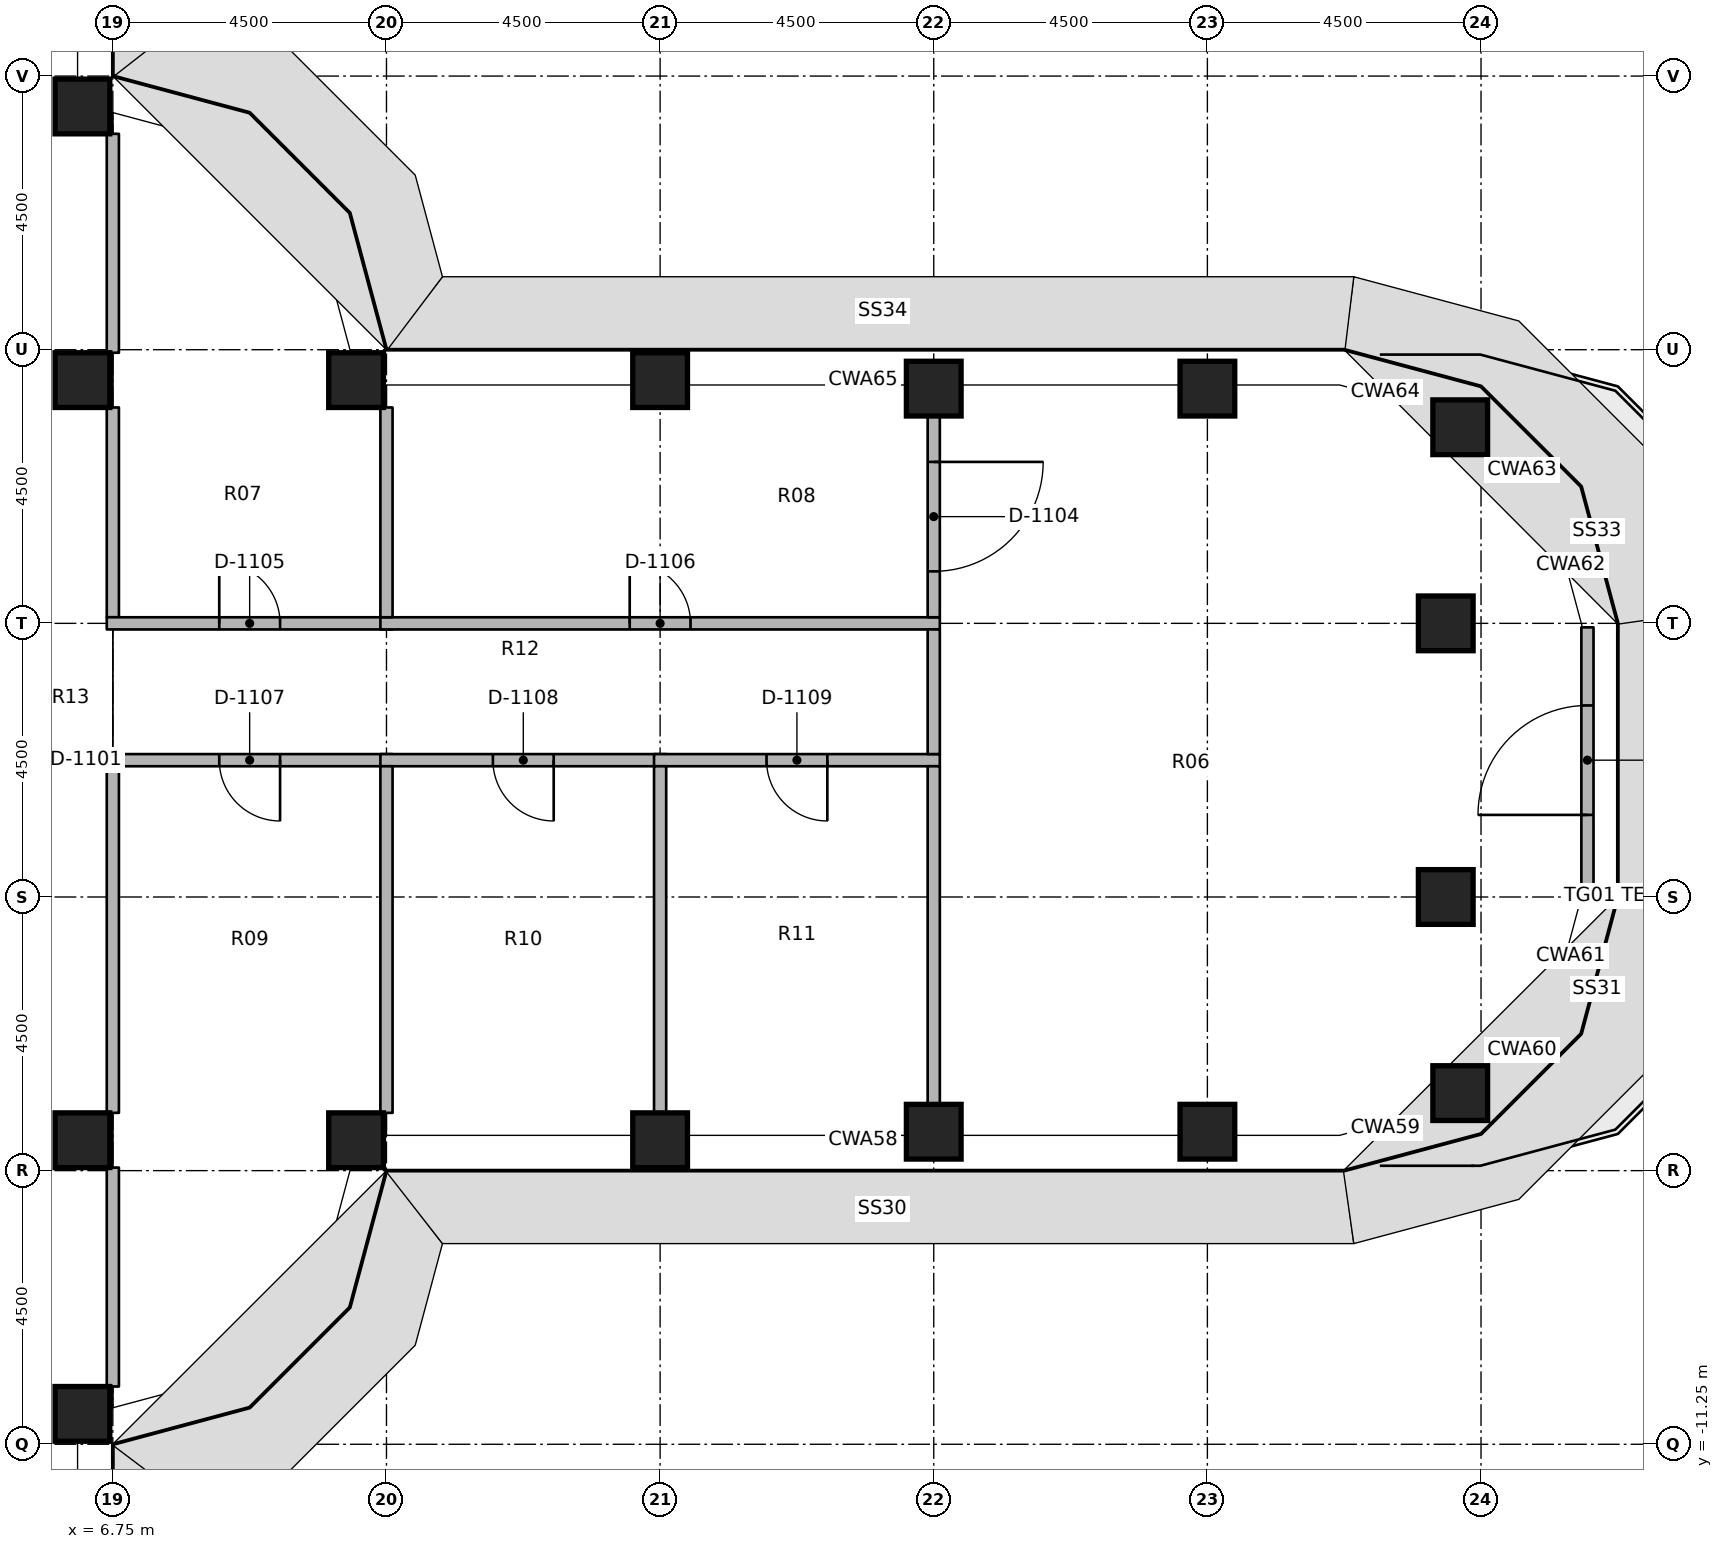
"""IFC4 building model, lengths in metres.
Left out: names, types, materials, properties, quantities, classifications, styles, units other than length and angle.
Written with IfcOpenShell. Run it as: python <this file> out.ifc"""

import sys

from ifc_helpers import new_model, si_unit, direction, frame, frame_2d, origin, origin_2d, place, context, subcontext, project, spatial, rectangle, extrude, element, fill, save


model = new_model("IFC4")
c1 = context("Model", 3, precision=1e-05, world=origin(), true_north=direction((0.0, 1.0)))
c2 = subcontext(c1, "Body", "Model", "MODEL_VIEW")
j1 = project(units=[si_unit("LENGTHUNIT", "METRE"), si_unit("PLANEANGLEUNIT", "RADIAN")], contexts=[c1])
p1 = place(None, origin())
s1 = spatial("IfcSite", under=j1, at=p1, CompositionType="ELEMENT")
p2 = place(p1, origin())
s2 = spatial("IfcBuilding", under=s1, at=p2, CompositionType="ELEMENT")
p3 = place(p2, frame((0.0, 0.0, 124.6)))
s3 = spatial("IfcBuildingStorey", under=s2, at=p3, CompositionType="ELEMENT", Elevation=124.6)
for number, where, z_axis, x_axis in (
    (1, (6.25, -10.75, 0.0), (0.0, 0.0, 1.0), (1.0, 0.0, 0.0)),
    (2, (6.25, -6.25, 0.0), (0.0, 0.0, 1.0), (1.0, 0.0, 0.0)),
    (3, (6.25, 6.25, 0.0), (0.0, 0.0, 1.0), (1.0, 0.0, 0.0)),
    (4, (6.25, 10.75, 0.0), (0.0, 0.0, 1.0), (1.0, 0.0, 0.0)),
    (5, (10.75, -6.25, 0.0), (0.0, 0.0, 1.0), (1.0, 0.0, 0.0)),
    (6, (10.75, 6.25, 0.0), (0.0, 0.0, 1.0), (1.0, 0.0, 0.0)),
    (7, (15.75, -6.25, 0.0), (0.0, 0.0, 1.0), (1.0, 0.0, 0.0)),
    (8, (15.75, 6.25, 0.0), (0.0, 0.0, 1.0), (1.0, 0.0, 0.0)),
    (9, (20.25, -6.11, 0.0), (0.0, 0.0, 1.0), (1.0, 0.0, 0.0)),
    (10, (20.25, 6.11, 0.0), (0.0, 0.0, 1.0), (1.0, 0.0, 0.0)),
    (11, (24.75, -6.11, 0.0), (0.0, 0.0, 1.0), (1.0, 0.0, 0.0)),
    (12, (24.75, 6.11, 0.0), (0.0, 0.0, 1.0), (1.0, 0.0, 0.0)),
    (13, (28.908, -5.475, 0.0), (0.0, 0.0, 1.0), (1.0, 0.0, 0.0)),
    (14, (28.67, -2.25, 0.0), (0.0, 0.0, 1.0), (1.0, 0.0, 0.0)),
    (15, (28.67, 2.25, 0.0), (0.0, 0.0, 1.0), (1.0, 0.0, 0.0)),
    (16, (28.908, 5.475, 0.0), (0.0, 0.0, 1.0), (1.0, 0.0, 0.0)),
):
    element("IfcColumn", number, at=place(p3, frame(where, z_axis=z_axis, x_axis=x_axis)), inside=s3, PredefinedType="COLUMN", context=c2, shape_type="SweptSolid", body=[
        extrude(rectangle(XDim=0.9, YDim=0.9, at=origin_2d()), origin(), (0.0, 0.0, 1.0), 3.65),
    ])
p4 = place(p3, frame((31.0, -2.184, 0.0), z_axis=(0.0, 0.0, 1.0), x_axis=(0.0, 1.0, 0.0)))
e17 = element("IfcWall", 17, at=p4, inside=s3, PredefinedType="SOLIDWALL", context=c2, shape_type="SweptSolid", body=[
    extrude(rectangle(XDim=4.368, YDim=0.2, at=frame_2d((2.184, 0.0))), origin(), (0.0, 0.0, 1.0), 2.75),
])
p5 = place(p4, frame((1.284, 0.0, 0.0)))
e18 = element("IfcOpeningElement", 18, at=p5, cuts=e17, PredefinedType="OPENING", context=c2, shape_type="SweptSolid", body=[
    extrude(rectangle(XDim=1.8, YDim=2.4, at=frame_2d((0.9, 1.2))), frame((0.0, 0.11, 0.0), z_axis=(0.0, -1.0, 0.0), x_axis=(1.0, 0.0, 0.0)), (0.0, 0.0, 1.0), 0.22),
])
p6 = place(p3, frame((6.75, 2.35, 0.0), z_axis=(0.0, 0.0, 1.0), x_axis=(0.0, 1.0, 0.0)))
e19 = element("IfcWall", 19, at=p6, inside=s3, PredefinedType="PARTITIONING", context=c2, shape_type="SweptSolid", body=[
    extrude(rectangle(XDim=3.45, YDim=0.2, at=frame_2d((1.725, 0.0))), origin(), (0.0, 0.0, 1.0), 2.738),
])
for number, where, z_axis, x_axis in (
    (20, (6.75, 6.7, 0.0), (0.0, 0.0, 1.0), (0.0, 1.0, 0.0)),
    (21, (6.75, -10.3, 0.0), (0.0, 0.0, 1.0), (0.0, 1.0, 0.0)),
):
    element("IfcWall", number, at=place(p3, frame(where, z_axis=z_axis, x_axis=x_axis)), inside=s3, PredefinedType="PARTITIONING", context=c2, shape_type="SweptSolid", body=[
        extrude(rectangle(XDim=3.6, YDim=0.2, at=frame_2d((1.8, 0.0))), origin(), (0.0, 0.0, 1.0), 2.738),
    ])
p7 = place(p3, frame((6.75, -5.8, 0.0), z_axis=(0.0, 0.0, 1.0), x_axis=(0.0, 1.0, 0.0)))
e22 = element("IfcWall", 22, at=p7, inside=s3, PredefinedType="PARTITIONING", context=c2, shape_type="SweptSolid", body=[
    extrude(rectangle(XDim=5.7, YDim=0.2, at=frame_2d((2.85, 0.0))), origin(), (0.0, 0.0, 1.0), 2.738),
])
p8 = place(p3, frame((6.65, 2.25, 0.0), z_axis=(0.0, 0.0, 1.0), x_axis=(1.0, 0.0, 0.0)))
e23 = element("IfcWall", 23, at=p8, inside=s3, PredefinedType="PARTITIONING", context=c2, shape_type="SweptSolid", body=[
    extrude(rectangle(XDim=4.7, YDim=0.2, at=frame_2d((2.35, 0.0))), origin(), (0.0, 0.0, 1.0), 2.738),
])
p9 = place(p8, frame((1.85, 0.0, 0.0)))
e24 = element("IfcOpeningElement", 24, at=p9, cuts=e23, PredefinedType="OPENING", context=c2, shape_type="SweptSolid", body=[
    extrude(rectangle(XDim=1.0, YDim=2.1, at=frame_2d((0.5, 1.05))), frame((0.0, 0.11, 0.0), z_axis=(0.0, -1.0, 0.0), x_axis=(1.0, 0.0, 0.0)), (0.0, 0.0, 1.0), 0.22),
])
p10 = place(p3, frame((11.35, 0.0, 0.0), z_axis=(0.0, 0.0, 1.0), x_axis=(-1.0, 0.0, 0.0)))
e25 = element("IfcWall", 25, at=p10, inside=s3, PredefinedType="PARTITIONING", context=c2, shape_type="SweptSolid", body=[
    extrude(rectangle(XDim=4.7, YDim=0.2, at=frame_2d((2.35, 0.0))), origin(), (0.0, 0.0, 1.0), 2.738),
])
p11 = place(p10, frame((1.85, 0.0, 0.0)))
e26 = element("IfcOpeningElement", 26, at=p11, cuts=e25, PredefinedType="OPENING", context=c2, shape_type="SweptSolid", body=[
    extrude(rectangle(XDim=1.0, YDim=2.1, at=frame_2d((0.5, 1.05))), frame((0.0, 0.11, 0.0), z_axis=(0.0, -1.0, 0.0), x_axis=(1.0, 0.0, 0.0)), (0.0, 0.0, 1.0), 0.22),
])
p12 = place(p3, frame((11.15, 2.25, 0.0), z_axis=(0.0, 0.0, 1.0), x_axis=(1.0, 0.0, 0.0)))
e27 = element("IfcWall", 27, at=p12, inside=s3, PredefinedType="PARTITIONING", context=c2, shape_type="SweptSolid", body=[
    extrude(rectangle(XDim=9.2, YDim=0.2, at=frame_2d((4.6, 0.0))), origin(), (0.0, 0.0, 1.0), 2.738),
])
p13 = place(p12, frame((4.1, 0.0, 0.0)))
e28 = element("IfcOpeningElement", 28, at=p13, cuts=e27, PredefinedType="OPENING", context=c2, shape_type="SweptSolid", body=[
    extrude(rectangle(XDim=1.0, YDim=2.1, at=frame_2d((0.5, 1.05))), frame((0.0, 0.11, 0.0), z_axis=(0.0, -1.0, 0.0), x_axis=(1.0, 0.0, 0.0)), (0.0, 0.0, 1.0), 0.22),
])
p14 = place(p3, frame((15.85, 0.0, 0.0), z_axis=(0.0, 0.0, 1.0), x_axis=(-1.0, 0.0, 0.0)))
e29 = element("IfcWall", 29, at=p14, inside=s3, PredefinedType="PARTITIONING", context=c2, shape_type="SweptSolid", body=[
    extrude(rectangle(XDim=4.7, YDim=0.2, at=frame_2d((2.35, 0.0))), origin(), (0.0, 0.0, 1.0), 2.738),
])
p15 = place(p14, frame((1.85, 0.0, 0.0)))
e30 = element("IfcOpeningElement", 30, at=p15, cuts=e29, PredefinedType="OPENING", context=c2, shape_type="SweptSolid", body=[
    extrude(rectangle(XDim=1.0, YDim=2.1, at=frame_2d((0.5, 1.05))), frame((0.0, 0.11, 0.0), z_axis=(0.0, -1.0, 0.0), x_axis=(1.0, 0.0, 0.0)), (0.0, 0.0, 1.0), 0.22),
])
p16 = place(p3, frame((20.35, 0.0, 0.0), z_axis=(0.0, 0.0, 1.0), x_axis=(-1.0, 0.0, 0.0)))
e31 = element("IfcWall", 31, at=p16, inside=s3, PredefinedType="PARTITIONING", context=c2, shape_type="SweptSolid", body=[
    extrude(rectangle(XDim=4.7, YDim=0.2, at=frame_2d((2.35, 0.0))), origin(), (0.0, 0.0, 1.0), 2.738),
])
p17 = place(p16, frame((1.85, 0.0, 0.0)))
e32 = element("IfcOpeningElement", 32, at=p17, cuts=e31, PredefinedType="OPENING", context=c2, shape_type="SweptSolid", body=[
    extrude(rectangle(XDim=1.0, YDim=2.1, at=frame_2d((0.5, 1.05))), frame((0.0, 0.11, 0.0), z_axis=(0.0, -1.0, 0.0), x_axis=(1.0, 0.0, 0.0)), (0.0, 0.0, 1.0), 0.22),
])
p18 = place(p3, frame((20.25, 0.1, 0.0), z_axis=(0.0, 0.0, 1.0), x_axis=(0.0, 1.0, 0.0)))
e33 = element("IfcWall", 33, at=p18, inside=s3, PredefinedType="PARTITIONING", context=c2, shape_type="SweptSolid", body=[
    extrude(rectangle(XDim=2.05, YDim=0.2, at=frame_2d((1.025, 0.0))), origin(), (0.0, 0.0, 1.0), 2.738),
])
p19 = place(p3, frame((11.25, 2.35, 0.0), z_axis=(0.0, 0.0, 1.0), x_axis=(0.0, 1.0, 0.0)))
e34 = element("IfcWall", 34, at=p19, inside=s3, PredefinedType="PARTITIONING", context=c2, shape_type="SweptSolid", body=[
    extrude(rectangle(XDim=3.45, YDim=0.2, at=frame_2d((1.725, 0.0))), origin(), (0.0, 0.0, 1.0), 2.738),
])
p20 = place(p3, frame((11.25, -5.8, 0.0), z_axis=(0.0, 0.0, 1.0), x_axis=(0.0, 1.0, 0.0)))
e35 = element("IfcWall", 35, at=p20, inside=s3, PredefinedType="PARTITIONING", context=c2, shape_type="SweptSolid", body=[
    extrude(rectangle(XDim=5.7, YDim=0.2, at=frame_2d((2.85, 0.0))), origin(), (0.0, 0.0, 1.0), 2.738),
])
p21 = place(p3, frame((20.25, 5.66, 0.0), z_axis=(0.0, 0.0, 1.0), x_axis=(0.0, -1.0, 0.0)))
e36 = element("IfcWall", 36, at=p21, inside=s3, PredefinedType="PARTITIONING", context=c2, shape_type="SweptSolid", body=[
    extrude(rectangle(XDim=3.31, YDim=0.2, at=frame_2d((1.655, 0.0))), origin(), (0.0, 0.0, 1.0), 2.738),
])
p22 = place(p21, frame((0.755, 0.0, 0.0)))
e37 = element("IfcOpeningElement", 37, at=p22, cuts=e36, PredefinedType="OPENING", context=c2, shape_type="SweptSolid", body=[
    extrude(rectangle(XDim=1.8, YDim=2.1, at=frame_2d((0.9, 1.05))), frame((0.0, 0.11, 0.0), z_axis=(0.0, -1.0, 0.0), x_axis=(1.0, 0.0, 0.0)), (0.0, 0.0, 1.0), 0.22),
])
p23 = place(p3, frame((15.75, -5.8, 0.0), z_axis=(0.0, 0.0, 1.0), x_axis=(0.0, 1.0, 0.0)))
e38 = element("IfcWall", 38, at=p23, inside=s3, PredefinedType="PARTITIONING", context=c2, shape_type="SweptSolid", body=[
    extrude(rectangle(XDim=5.7, YDim=0.2, at=frame_2d((2.85, 0.0))), origin(), (0.0, 0.0, 1.0), 2.738),
])
p24 = place(p3, frame((20.25, -5.66, 0.0), z_axis=(0.0, 0.0, 1.0), x_axis=(0.0, 1.0, 0.0)))
e39 = element("IfcWall", 39, at=p24, inside=s3, PredefinedType="PARTITIONING", context=c2, shape_type="SweptSolid", body=[
    extrude(rectangle(XDim=5.56, YDim=0.2, at=frame_2d((2.78, 0.0))), origin(), (0.0, 0.0, 1.0), 2.738),
])
p25 = place(p5, origin())
e40 = element("IfcDoor", 40, at=p25, inside=s3, OperationType="SINGLE_SWING_LEFT", PredefinedType="DOOR", context=c2, shape_type="SweptSolid", body=[
    extrude(rectangle(XDim=1.8, YDim=2.4, at=frame_2d((0.9, 1.2))), frame((0.0, 0.025, 0.0), z_axis=(0.0, -1.0, 0.0), x_axis=(1.0, 0.0, 0.0)), (0.0, 0.0, 1.0), 0.05),
])
fill(e18, e40)
p26 = place(p22, origin())
e41 = element("IfcDoor", 41, at=p26, inside=s3, OperationType="DOUBLE_DOOR_SINGLE_SWING", PredefinedType="DOOR", context=c2, shape_type="SweptSolid", body=[
    extrude(rectangle(XDim=1.8, YDim=2.1, at=frame_2d((0.9, 1.05))), frame((0.0, 0.025, 0.0), z_axis=(0.0, -1.0, 0.0), x_axis=(1.0, 0.0, 0.0)), (0.0, 0.0, 1.0), 0.05),
])
fill(e37, e41)
p27 = place(p9, origin())
e42 = element("IfcDoor", 42, at=p27, inside=s3, OperationType="SINGLE_SWING_RIGHT", PredefinedType="DOOR", context=c2, shape_type="SweptSolid", body=[
    extrude(rectangle(XDim=1.0, YDim=2.1, at=frame_2d((0.5, 1.05))), frame((0.0, 0.025, 0.0), z_axis=(0.0, -1.0, 0.0), x_axis=(1.0, 0.0, 0.0)), (0.0, 0.0, 1.0), 0.05),
])
fill(e24, e42)
p28 = place(p13, origin())
e43 = element("IfcDoor", 43, at=p28, inside=s3, OperationType="SINGLE_SWING_LEFT", PredefinedType="DOOR", context=c2, shape_type="SweptSolid", body=[
    extrude(rectangle(XDim=1.0, YDim=2.1, at=frame_2d((0.5, 1.05))), frame((0.0, 0.025, 0.0), z_axis=(0.0, -1.0, 0.0), x_axis=(1.0, 0.0, 0.0)), (0.0, 0.0, 1.0), 0.05),
])
fill(e28, e43)
p29 = place(p11, origin())
e44 = element("IfcDoor", 44, at=p29, inside=s3, OperationType="SINGLE_SWING_RIGHT", PredefinedType="DOOR", context=c2, shape_type="SweptSolid", body=[
    extrude(rectangle(XDim=1.0, YDim=2.1, at=frame_2d((0.5, 1.05))), frame((0.0, 0.025, 0.0), z_axis=(0.0, -1.0, 0.0), x_axis=(1.0, 0.0, 0.0)), (0.0, 0.0, 1.0), 0.05),
])
fill(e26, e44)
p30 = place(p15, origin())
e45 = element("IfcDoor", 45, at=p30, inside=s3, OperationType="SINGLE_SWING_RIGHT", PredefinedType="DOOR", context=c2, shape_type="SweptSolid", body=[
    extrude(rectangle(XDim=1.0, YDim=2.1, at=frame_2d((0.5, 1.05))), frame((0.0, 0.025, 0.0), z_axis=(0.0, -1.0, 0.0), x_axis=(1.0, 0.0, 0.0)), (0.0, 0.0, 1.0), 0.05),
])
fill(e30, e45)
p31 = place(p17, origin())
e46 = element("IfcDoor", 46, at=p31, inside=s3, OperationType="SINGLE_SWING_RIGHT", PredefinedType="DOOR", context=c2, shape_type="SweptSolid", body=[
    extrude(rectangle(XDim=1.0, YDim=2.1, at=frame_2d((0.5, 1.05))), frame((0.0, 0.025, 0.0), z_axis=(0.0, -1.0, 0.0), x_axis=(1.0, 0.0, 0.0)), (0.0, 0.0, 1.0), 0.05),
])
fill(e32, e46)
save(model, sys.argv[1])
